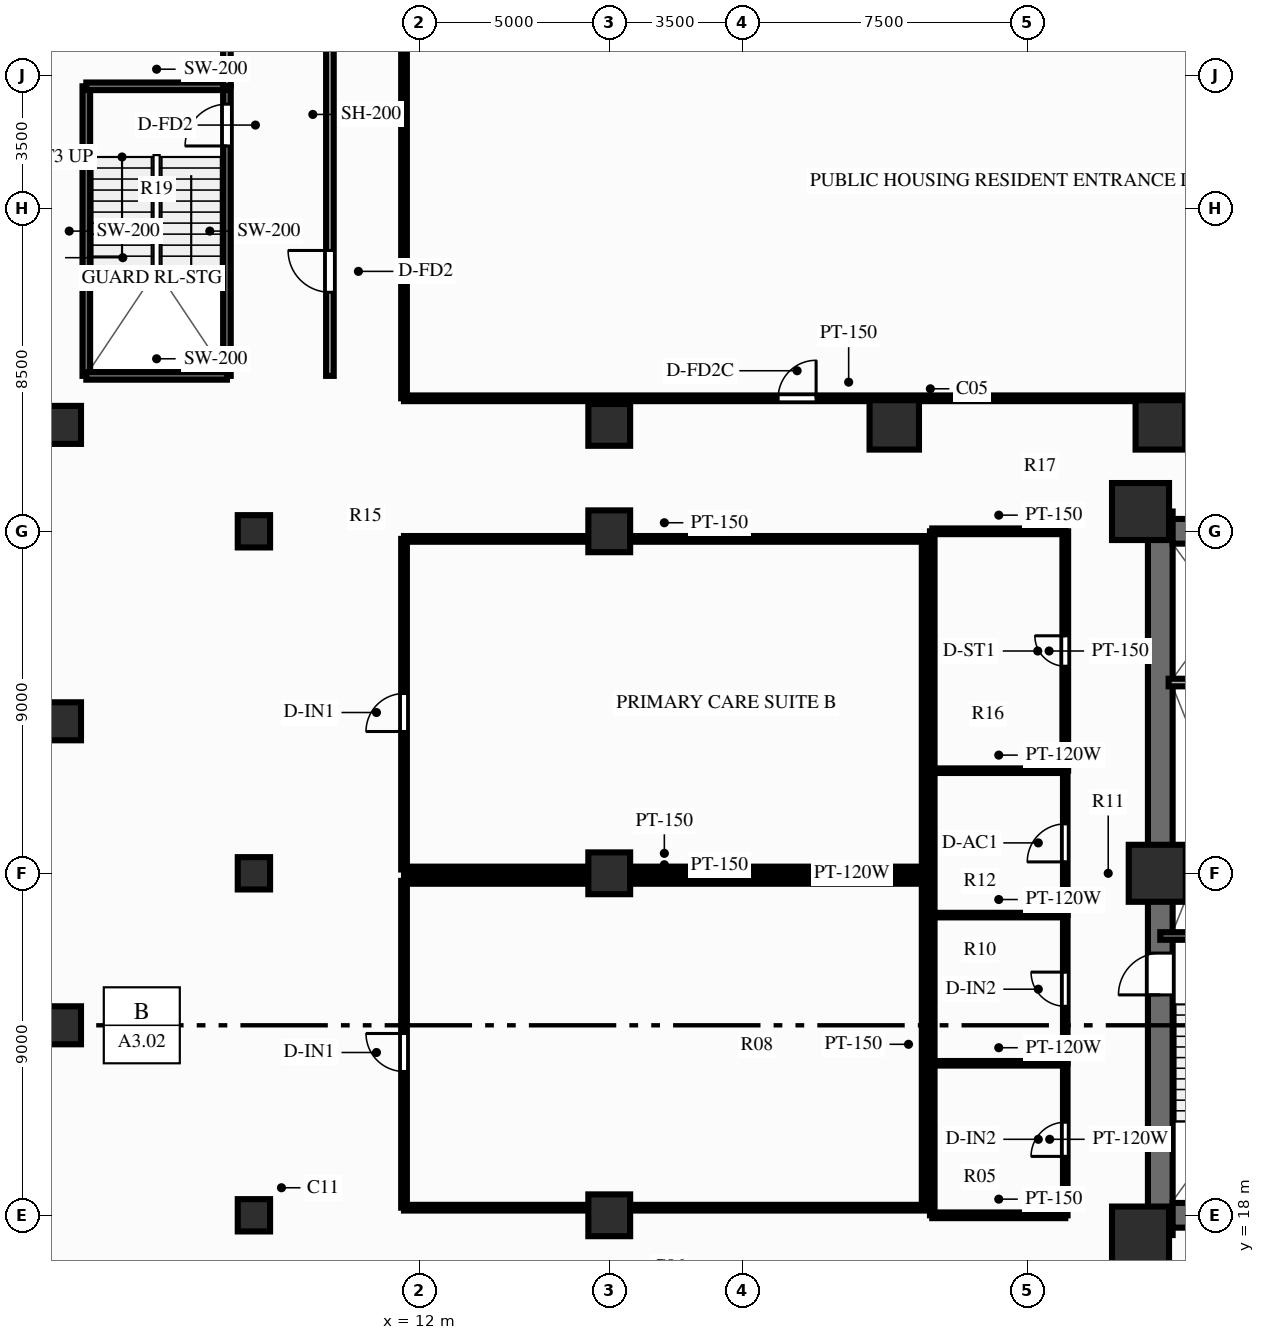
"""IFC4 building model, lengths in metres.
Left out: names, types, materials, properties, quantities, classifications, styles, units other than length and angle.
Written with IfcOpenShell. Run it as: python <this file> out.ifc"""

import sys

from ifc_helpers import new_model, si_unit, direction, frame, frame_2d, origin, origin_2d, place, context, subcontext, project, spatial, rectangle, circle, extrude, source, transform, mapped, element, fill, save


model = new_model("IFC4")
c1 = context("Model", 3, precision=1e-05, world=origin(), true_north=direction((0.0, 1.0)))
c2 = subcontext(c1, "Body", "Model", "MODEL_VIEW")
j1 = project(units=[si_unit("LENGTHUNIT", "METRE"), si_unit("PLANEANGLEUNIT", "RADIAN")], contexts=[c1])
p1 = place(None, origin())
s1 = spatial("IfcSite", under=j1, at=p1, CompositionType="ELEMENT")
p2 = place(p1, origin())
s2 = spatial("IfcBuilding", under=s1, at=p2, CompositionType="ELEMENT")
p3 = place(p2, origin())
s3 = spatial("IfcBuildingStorey", under=s2, at=p3, CompositionType="ELEMENT", Elevation=0.0)
p4 = place(p3, frame((31.5, 17.48, 0.0), z_axis=(0.0, 0.0, 1.0), x_axis=(0.0, 1.0, 0.0)))
e1 = element("IfcWall", 1, at=p4, inside=s3, PredefinedType="SHEAR", context=c2, shape_type="SweptSolid", body=[
    extrude(rectangle(XDim=19.04, YDim=0.65, at=frame_2d((9.52, 0.0))), origin(), (0.0, 0.0, 1.0), 4.2),
])
p5 = place(p4, frame((6.32, 0.0, 0.0)))
e2 = element("IfcOpeningElement", 2, at=p5, cuts=e1, PredefinedType="OPENING", context=c2, shape_type="SweptSolid", body=[
    extrude(rectangle(XDim=1.1, YDim=2.15, at=frame_2d((0.55, 1.075))), frame((0.0, 0.337, 0.0), z_axis=(0.0, -1.0, 0.0), x_axis=(1.0, 0.0, 0.0)), (0.0, 0.0, 1.0), 0.674),
])
p6 = place(p3, frame((31.825, 18.0, 0.0), z_axis=(0.0, 0.0, 1.0), x_axis=(1.0, 0.0, 0.0)))
e3 = element("IfcWall", 3, at=p6, inside=s3, PredefinedType="SHEAR", context=c2, shape_type="SweptSolid", body=[
    extrude(rectangle(XDim=12.35, YDim=0.65, at=frame_2d((6.175, 0.0))), origin(), (0.0, 0.0, 1.0), 4.2),
])
p7 = place(p3, frame((31.825, 36.0, 0.0), z_axis=(0.0, 0.0, 1.0), x_axis=(1.0, 0.0, 0.0)))
e4 = element("IfcWall", 4, at=p7, inside=s3, PredefinedType="SHEAR", context=c2, shape_type="SweptSolid", body=[
    extrude(rectangle(XDim=12.35, YDim=0.65, at=frame_2d((6.175, 0.0))), origin(), (0.0, 0.0, 1.0), 4.2),
])
p8 = place(p7, frame((5.125, 0.0, 0.0), z_axis=(0.0, 0.0, 1.0), x_axis=(-1.0, 0.0, 0.0)))
e5 = element("IfcOpeningElement", 5, at=p8, cuts=e4, PredefinedType="OPENING", context=c2, shape_type="SweptSolid", body=[
    extrude(rectangle(XDim=1.4, YDim=2.15, at=frame_2d((0.7, 1.075))), frame((0.0, 0.337, 0.0), z_axis=(0.0, -1.0, 0.0), x_axis=(1.0, 0.0, 0.0)), (0.0, 0.0, 1.0), 0.674),
])
m1 = source(origin(), c2, "Body", "SweptSolid", [
    extrude(rectangle(XDim=1.5, YDim=1.5, at=origin_2d()), origin(), (0.0, 0.0, 1.0), 4.2),
])
for number, where, z_axis, x_axis in (
    (6, (30.98, 17.48, 0.0), (0.0, 0.0, 1.0), (1.0, 0.0, 0.0)),
    (7, (30.98, 36.52, 0.0), (0.0, 0.0, 1.0), (1.0, 0.0, 0.0)),
    (8, (31.42, 27.0, 0.0), (0.0, 0.0, 1.0), (1.0, 0.0, 0.0)),
):
    element("IfcColumn", number, at=place(p3, frame(where, z_axis=z_axis, x_axis=x_axis)), inside=s3, PredefinedType="COLUMN", context=c2, shape_type="MappedRepresentation", body=[
        mapped(m1, transform((0.0, 0.0, 0.0), scale=1.0)),
    ])
m2 = source(origin(), c2, "Body", "SweptSolid", [
    extrude(circle(Radius=0.5, at=origin_2d()), origin(), (0.0, 0.0, 1.0), 4.2),
])
for number, where, z_axis, x_axis in (
    (9, (2.6, 23.0, 0.0), (0.0, 0.0, 1.0), (1.0, 0.0, 0.0)),
    (10, (2.6, 31.0, 0.0), (0.0, 0.0, 1.0), (1.0, 0.0, 0.0)),
    (11, (2.6, 38.8, 0.0), (0.0, 0.0, 1.0), (1.0, 0.0, 0.0)),
):
    element("IfcColumn", number, at=place(p3, frame(where, z_axis=z_axis, x_axis=x_axis)), inside=s3, PredefinedType="COLUMN", context=c2, shape_type="MappedRepresentation", body=[
        mapped(m2, transform((0.0, 0.0, 0.0), scale=1.0)),
    ])
m3 = source(origin(), c2, "Body", "SweptSolid", [
    extrude(circle(Radius=0.425, at=origin_2d()), origin(), (0.0, 0.0, 1.0), 4.2),
])
for number, where, z_axis, x_axis in (
    (12, (7.65, 18.0, 0.0), (0.0, 0.0, 1.0), (1.0, 0.0, 0.0)),
    (13, (7.65, 27.0, 0.0), (0.0, 0.0, 1.0), (1.0, 0.0, 0.0)),
    (14, (7.65, 36.0, 0.0), (0.0, 0.0, 1.0), (1.0, 0.0, 0.0)),
):
    element("IfcColumn", number, at=place(p3, frame(where, z_axis=z_axis, x_axis=x_axis)), inside=s3, PredefinedType="COLUMN", context=c2, shape_type="MappedRepresentation", body=[
        mapped(m3, transform((0.0, 0.0, 0.0), scale=1.0)),
    ])
m4 = source(origin(), c2, "Body", "SweptSolid", [
    extrude(rectangle(XDim=1.1, YDim=1.1, at=origin_2d()), origin(), (0.0, 0.0, 1.0), 4.2),
])
for number, where, z_axis, x_axis in (
    (15, (17.0, 18.0, 0.0), (0.0, 0.0, 1.0), (1.0, 0.0, 0.0)),
    (16, (17.0, 27.0, 0.0), (0.0, 0.0, 1.0), (1.0, 0.0, 0.0)),
    (17, (17.0, 36.0, 0.0), (0.0, 0.0, 1.0), (1.0, 0.0, 0.0)),
    (18, (17.0, 38.8, 0.0), (0.0, 0.0, 1.0), (1.0, 0.0, 0.0)),
):
    element("IfcColumn", number, at=place(p3, frame(where, z_axis=z_axis, x_axis=x_axis)), inside=s3, PredefinedType="COLUMN", context=c2, shape_type="MappedRepresentation", body=[
        mapped(m4, transform((0.0, 0.0, 0.0), scale=1.0)),
    ])
m5 = source(origin(), c2, "Body", "SweptSolid", [
    extrude(rectangle(XDim=1.3, YDim=1.3, at=origin_2d()), origin(), (0.0, 0.0, 1.0), 4.2),
])
for number, where, z_axis, x_axis in (
    (19, (24.5, 38.8, 0.0), (0.0, 0.0, 1.0), (1.0, 0.0, 0.0)),
    (20, (31.5, 38.8, 0.0), (0.0, 0.0, 1.0), (1.0, 0.0, 0.0)),
):
    element("IfcColumn", number, at=place(p3, frame(where, z_axis=z_axis, x_axis=x_axis)), inside=s3, PredefinedType="COLUMN", context=c2, shape_type="MappedRepresentation", body=[
        mapped(m5, transform((0.0, 0.0, 0.0), scale=1.0)),
    ])
p9 = place(p3, frame((31.5, 25.35, 0.0), z_axis=(0.0, 0.0, 1.0), x_axis=(1.0, 0.0, 0.0)))
e21 = element("IfcWall", 21, at=p9, inside=s3, PredefinedType="SOLIDWALL", context=c2, shape_type="SweptSolid", body=[
    extrude(rectangle(XDim=3.93, YDim=0.2, at=frame_2d((1.965, 0.0))), origin(), (0.0, 0.0, 1.0), 3.92),
])
p10 = place(p3, frame((31.72, 32.02, 0.0), z_axis=(0.0, 0.0, 1.0), x_axis=(1.0, 0.0, 0.0)))
e22 = element("IfcWall", 22, at=p10, inside=s3, PredefinedType="PARTITIONING", context=c2, shape_type="SweptSolid", body=[
    extrude(rectangle(XDim=2.8, YDim=0.2, at=frame_2d((1.4, 0.0))), origin(), (0.0, 0.0, 1.0), 3.92),
])
p11 = place(p3, frame((3.24, 40.09, 0.0), z_axis=(0.0, 0.0, 1.0), x_axis=(0.0, 1.0, 0.0)))
e23 = element("IfcWall", 23, at=p11, inside=s3, PredefinedType="SOLIDWALL", context=c2, shape_type="SweptSolid", body=[
    extrude(rectangle(XDim=7.62, YDim=0.2, at=frame_2d((3.81, 0.0))), origin(), (0.0, 0.0, 1.0), 3.92),
])
p12 = place(p3, frame((6.94, 40.09, 0.0), z_axis=(0.0, 0.0, 1.0), x_axis=(0.0, 1.0, 0.0)))
e24 = element("IfcWall", 24, at=p12, inside=s3, PredefinedType="SOLIDWALL", context=c2, shape_type="SweptSolid", body=[
    extrude(rectangle(XDim=7.62, YDim=0.2, at=frame_2d((3.81, 0.0))), origin(), (0.0, 0.0, 1.0), 3.92),
])
p13 = place(p12, frame((7.15, 0.0, 0.0), z_axis=(0.0, 0.0, 1.0), x_axis=(-1.0, 0.0, 0.0)))
e25 = element("IfcOpeningElement", 25, at=p13, cuts=e24, PredefinedType="OPENING", context=c2, shape_type="SweptSolid", body=[
    extrude(rectangle(XDim=1.1, YDim=2.15, at=frame_2d((0.55, 1.075))), frame((0.0, 0.112, 0.0), z_axis=(0.0, -1.0, 0.0), x_axis=(1.0, 0.0, 0.0)), (0.0, 0.0, 1.0), 0.224),
])
for number, where, z_axis, x_axis in (
    (26, (3.24, 40.09, 0.0), (0.0, 0.0, 1.0), (1.0, 0.0, 0.0)),
    (27, (3.24, 47.71, 0.0), (0.0, 0.0, 1.0), (1.0, 0.0, 0.0)),
):
    element("IfcWall", number, at=place(p3, frame(where, z_axis=z_axis, x_axis=x_axis)), inside=s3, PredefinedType="SOLIDWALL", context=c2, shape_type="SweptSolid", body=[
        extrude(rectangle(XDim=3.7, YDim=0.2, at=frame_2d((1.85, 0.0))), origin(), (0.0, 0.0, 1.0), 3.92),
    ])
p14 = place(p3, frame((6.94, 47.71, 0.0), z_axis=(0.0, 0.0, 1.0), x_axis=(0.0, 1.0, 0.0)))
e28 = element("IfcWall", 28, at=p14, inside=s3, PredefinedType="PARTITIONING", context=c2, shape_type="SweptSolid", body=[
    extrude(rectangle(XDim=6.14, YDim=0.2, at=frame_2d((3.07, 0.0))), origin(), (0.0, 0.0, 1.0), 3.92),
])
p15 = place(p3, frame((9.65, 40.09, 0.0), z_axis=(0.0, 0.0, 1.0), x_axis=(0.0, 1.0, 0.0)))
e29 = element("IfcWall", 29, at=p15, inside=s3, PredefinedType="PARTITIONING", context=c2, shape_type="SweptSolid", body=[
    extrude(rectangle(XDim=13.76, YDim=0.2, at=frame_2d((6.88, 0.0))), origin(), (0.0, 0.0, 1.0), 3.92),
])
p16 = place(p15, frame((3.3, 0.0, 0.0), z_axis=(0.0, 0.0, 1.0), x_axis=(-1.0, 0.0, 0.0)))
e30 = element("IfcOpeningElement", 30, at=p16, cuts=e29, PredefinedType="OPENING", context=c2, shape_type="SweptSolid", body=[
    extrude(rectangle(XDim=1.1, YDim=2.15, at=frame_2d((0.55, 1.075))), frame((0.0, 0.112, 0.0), z_axis=(0.0, -1.0, 0.0), x_axis=(1.0, 0.0, 0.0)), (0.0, 0.0, 1.0), 0.224),
])
p17 = place(p3, frame((25.5, 18.0, 0.0), z_axis=(0.0, 0.0, 1.0), x_axis=(0.0, 1.0, 0.0)))
e31 = element("IfcWall", 31, at=p17, inside=s3, PredefinedType="PARTITIONING", context=c2, shape_type="SweptSolid", body=[
    extrude(rectangle(XDim=18.0, YDim=0.12, at=frame_2d((9.0, 0.0))), origin(), (0.0, 0.0, 1.0), 3.92),
])
p18 = place(p3, frame((29.0, 18.0, 0.0), z_axis=(0.0, 0.0, 1.0), x_axis=(0.0, 1.0, 0.0)))
e32 = element("IfcWall", 32, at=p18, inside=s3, PredefinedType="PARTITIONING", context=c2, shape_type="SweptSolid", body=[
    extrude(rectangle(XDim=4.0, YDim=0.12, at=frame_2d((2.0, 0.0))), origin(), (0.0, 0.0, 1.0), 3.92),
])
p19 = place(p18, frame((1.55, 0.0, 0.0)))
e33 = element("IfcOpeningElement", 33, at=p19, cuts=e32, PredefinedType="OPENING", context=c2, shape_type="SweptSolid", body=[
    extrude(rectangle(XDim=0.9, YDim=2.1, at=frame_2d((0.45, 1.05))), frame((0.0, 0.072, 0.0), z_axis=(0.0, -1.0, 0.0), x_axis=(1.0, 0.0, 0.0)), (0.0, 0.0, 1.0), 0.144),
])
p20 = place(p3, frame((29.0, 22.0, 0.0), z_axis=(0.0, 0.0, 1.0), x_axis=(0.0, 1.0, 0.0)))
e34 = element("IfcWall", 34, at=p20, inside=s3, PredefinedType="PARTITIONING", context=c2, shape_type="SweptSolid", body=[
    extrude(rectangle(XDim=3.9, YDim=0.12, at=frame_2d((1.95, 0.0))), origin(), (0.0, 0.0, 1.0), 3.92),
])
p21 = place(p20, frame((1.5, 0.0, 0.0)))
e35 = element("IfcOpeningElement", 35, at=p21, cuts=e34, PredefinedType="OPENING", context=c2, shape_type="SweptSolid", body=[
    extrude(rectangle(XDim=0.9, YDim=2.1, at=frame_2d((0.45, 1.05))), frame((0.0, 0.072, 0.0), z_axis=(0.0, -1.0, 0.0), x_axis=(1.0, 0.0, 0.0)), (0.0, 0.0, 1.0), 0.144),
])
p22 = place(p3, frame((29.0, 25.9, 0.0), z_axis=(0.0, 0.0, 1.0), x_axis=(0.0, 1.0, 0.0)))
e36 = element("IfcWall", 36, at=p22, inside=s3, PredefinedType="PARTITIONING", context=c2, shape_type="SweptSolid", body=[
    extrude(rectangle(XDim=3.8, YDim=0.12, at=frame_2d((1.9, 0.0))), origin(), (0.0, 0.0, 1.0), 3.92),
])
p23 = place(p22, frame((1.4, 0.0, 0.0)))
e37 = element("IfcOpeningElement", 37, at=p23, cuts=e36, PredefinedType="OPENING", context=c2, shape_type="SweptSolid", body=[
    extrude(rectangle(XDim=1.0, YDim=2.1, at=frame_2d((0.5, 1.05))), frame((0.0, 0.072, 0.0), z_axis=(0.0, -1.0, 0.0), x_axis=(1.0, 0.0, 0.0)), (0.0, 0.0, 1.0), 0.144),
])
p24 = place(p3, frame((29.0, 29.7, 0.0), z_axis=(0.0, 0.0, 1.0), x_axis=(0.0, 1.0, 0.0)))
e38 = element("IfcWall", 38, at=p24, inside=s3, PredefinedType="PARTITIONING", context=c2, shape_type="SweptSolid", body=[
    extrude(rectangle(XDim=6.3, YDim=0.15, at=frame_2d((3.15, 0.0))), origin(), (0.0, 0.0, 1.0), 3.92),
])
p25 = place(p24, frame((2.75, 0.0, 0.0)))
e39 = element("IfcOpeningElement", 39, at=p25, cuts=e38, PredefinedType="OPENING", context=c2, shape_type="SweptSolid", body=[
    extrude(rectangle(XDim=0.8, YDim=2.05, at=frame_2d((0.4, 1.025))), frame((0.0, 0.087, 0.0), z_axis=(0.0, -1.0, 0.0), x_axis=(1.0, 0.0, 0.0)), (0.0, 0.0, 1.0), 0.174),
])
for number, where, z_axis, x_axis in (
    (40, (25.5, 22.0, 0.0), (0.0, 0.0, 1.0), (1.0, 0.0, 0.0)),
    (41, (25.5, 25.9, 0.0), (0.0, 0.0, 1.0), (1.0, 0.0, 0.0)),
    (42, (25.5, 29.7, 0.0), (0.0, 0.0, 1.0), (1.0, 0.0, 0.0)),
):
    element("IfcWall", number, at=place(p3, frame(where, z_axis=z_axis, x_axis=x_axis)), inside=s3, PredefinedType="PARTITIONING", context=c2, shape_type="SweptSolid", body=[
        extrude(rectangle(XDim=3.5, YDim=0.12, at=frame_2d((1.75, 0.0))), origin(), (0.0, 0.0, 1.0), 3.92),
    ])
for number, where, z_axis, x_axis in (
    (43, (25.5, 36.0, 0.0), (0.0, 0.0, 1.0), (1.0, 0.0, 0.0)),
    (44, (25.5, 18.0, 0.0), (0.0, 0.0, 1.0), (1.0, 0.0, 0.0)),
):
    element("IfcWall", number, at=place(p3, frame(where, z_axis=z_axis, x_axis=x_axis)), inside=s3, PredefinedType="PARTITIONING", context=c2, shape_type="SweptSolid", body=[
        extrude(rectangle(XDim=3.5, YDim=0.15, at=frame_2d((1.75, 0.0))), origin(), (0.0, 0.0, 1.0), 3.29),
    ])
p26 = place(p3, frame((11.6, 39.5, 0.0), z_axis=(0.0, 0.0, 1.0), x_axis=(1.0, 0.0, 0.0)))
e45 = element("IfcWall", 45, at=p26, inside=s3, PredefinedType="PARTITIONING", context=c2, shape_type="SweptSolid", body=[
    extrude(rectangle(XDim=23.4, YDim=0.15, at=frame_2d((11.7, 0.0))), origin(), (0.0, 0.0, 1.0), 3.92),
])
p27 = place(p26, frame((9.844, 0.0, 0.0)))
e46 = element("IfcOpeningElement", 46, at=p27, cuts=e45, PredefinedType="OPENING", context=c2, shape_type="SweptSolid", body=[
    extrude(rectangle(XDim=1.0, YDim=2.15, at=frame_2d((0.5, 1.075))), frame((0.0, 0.087, 0.0), z_axis=(0.0, -1.0, 0.0), x_axis=(1.0, 0.0, 0.0)), (0.0, 0.0, 1.0), 0.174),
])
p28 = place(p3, frame((11.6, 39.5, 0.0), z_axis=(0.0, 0.0, 1.0), x_axis=(0.0, 1.0, 0.0)))
e47 = element("IfcWall", 47, at=p28, inside=s3, PredefinedType="PARTITIONING", context=c2, shape_type="SweptSolid", body=[
    extrude(rectangle(XDim=14.4, YDim=0.15, at=frame_2d((7.2, 0.0))), origin(), (0.0, 0.0, 1.0), 3.92),
])
for number, where, z_axis, x_axis in (
    (48, (11.6, 18.2, 0.0), (0.0, 0.0, 1.0), (1.0, 0.0, 0.0)),
    (49, (11.6, 26.8, 0.0), (0.0, 0.0, 1.0), (1.0, 0.0, 0.0)),
):
    element("IfcWall", number, at=place(p3, frame(where, z_axis=z_axis, x_axis=x_axis)), inside=s3, PredefinedType="PARTITIONING", context=c2, shape_type="SweptSolid", body=[
        extrude(rectangle(XDim=13.7, YDim=0.15, at=frame_2d((6.85, 0.0))), origin(), (0.0, 0.0, 1.0), 3.92),
    ])
p29 = place(p3, frame((11.6, 18.2, 0.0), z_axis=(0.0, 0.0, 1.0), x_axis=(0.0, 1.0, 0.0)))
e50 = element("IfcWall", 50, at=p29, inside=s3, PredefinedType="PARTITIONING", context=c2, shape_type="SweptSolid", body=[
    extrude(rectangle(XDim=8.6, YDim=0.15, at=frame_2d((4.3, 0.0))), origin(), (0.0, 0.0, 1.0), 3.92),
])
p30 = place(p29, frame((3.584, 0.0, 0.0)))
e51 = element("IfcOpeningElement", 51, at=p30, cuts=e50, PredefinedType="OPENING", context=c2, shape_type="SweptSolid", body=[
    extrude(rectangle(XDim=1.0, YDim=2.1, at=frame_2d((0.5, 1.05))), frame((0.0, 0.087, 0.0), z_axis=(0.0, -1.0, 0.0), x_axis=(1.0, 0.0, 0.0)), (0.0, 0.0, 1.0), 0.174),
])
p31 = place(p3, frame((25.3, 18.2, 0.0), z_axis=(0.0, 0.0, 1.0), x_axis=(0.0, 1.0, 0.0)))
e52 = element("IfcWall", 52, at=p31, inside=s3, PredefinedType="PARTITIONING", context=c2, shape_type="SweptSolid", body=[
    extrude(rectangle(XDim=8.6, YDim=0.15, at=frame_2d((4.3, 0.0))), origin(), (0.0, 0.0, 1.0), 3.92),
])
for number, where, z_axis, x_axis in (
    (53, (11.6, 27.1, 0.0), (0.0, 0.0, 1.0), (1.0, 0.0, 0.0)),
    (54, (11.6, 35.8, 0.0), (0.0, 0.0, 1.0), (1.0, 0.0, 0.0)),
):
    element("IfcWall", number, at=place(p3, frame(where, z_axis=z_axis, x_axis=x_axis)), inside=s3, PredefinedType="PARTITIONING", context=c2, shape_type="SweptSolid", body=[
        extrude(rectangle(XDim=13.7, YDim=0.15, at=frame_2d((6.85, 0.0))), origin(), (0.0, 0.0, 1.0), 3.92),
    ])
p32 = place(p3, frame((11.6, 27.1, 0.0), z_axis=(0.0, 0.0, 1.0), x_axis=(0.0, 1.0, 0.0)))
e55 = element("IfcWall", 55, at=p32, inside=s3, PredefinedType="PARTITIONING", context=c2, shape_type="SweptSolid", body=[
    extrude(rectangle(XDim=8.7, YDim=0.15, at=frame_2d((4.35, 0.0))), origin(), (0.0, 0.0, 1.0), 3.92),
])
p33 = place(p32, frame((3.631, 0.0, 0.0)))
e56 = element("IfcOpeningElement", 56, at=p33, cuts=e55, PredefinedType="OPENING", context=c2, shape_type="SweptSolid", body=[
    extrude(rectangle(XDim=1.0, YDim=2.1, at=frame_2d((0.5, 1.05))), frame((0.0, 0.087, 0.0), z_axis=(0.0, -1.0, 0.0), x_axis=(1.0, 0.0, 0.0)), (0.0, 0.0, 1.0), 0.174),
])
p34 = place(p3, frame((25.3, 27.1, 0.0), z_axis=(0.0, 0.0, 1.0), x_axis=(0.0, 1.0, 0.0)))
e57 = element("IfcWall", 57, at=p34, inside=s3, PredefinedType="PARTITIONING", context=c2, shape_type="SweptSolid", body=[
    extrude(rectangle(XDim=8.7, YDim=0.15, at=frame_2d((4.35, 0.0))), origin(), (0.0, 0.0, 1.0), 3.92),
])
m6 = source(origin(), c2, "Body", "SweptSolid", [
    extrude(rectangle(XDim=1.1, YDim=2.15, at=frame_2d((0.55, 1.075))), frame((0.0, 0.025, 0.0), z_axis=(0.0, -1.0, 0.0), x_axis=(1.0, 0.0, 0.0)), (0.0, 0.0, 1.0), 0.05),
])
p35 = place(p5, origin())
e58 = element("IfcDoor", 58, at=p35, inside=s3, OperationType="SINGLE_SWING_LEFT", PredefinedType="DOOR", context=c2, shape_type="MappedRepresentation", body=[
    mapped(m6, transform((0.0, 0.0, 0.0), scale=1.0)),
])
fill(e2, e58)
p36 = place(p13, origin())
e59 = element("IfcDoor", 59, at=p36, inside=s3, OperationType="SINGLE_SWING_RIGHT", PredefinedType="DOOR", context=c2, shape_type="MappedRepresentation", body=[
    mapped(m6, transform((0.0, 0.0, 0.0), scale=1.0)),
])
fill(e25, e59)
p37 = place(p16, origin())
e60 = element("IfcDoor", 60, at=p37, inside=s3, OperationType="SINGLE_SWING_LEFT", PredefinedType="DOOR", context=c2, shape_type="MappedRepresentation", body=[
    mapped(m6, transform((0.0, 0.0, 0.0), scale=1.0)),
])
fill(e30, e60)
m7 = source(origin(), c2, "Body", "SweptSolid", [
    extrude(rectangle(XDim=0.9, YDim=2.1, at=frame_2d((0.45, 1.05))), frame((0.0, 0.025, 0.0), z_axis=(0.0, -1.0, 0.0), x_axis=(1.0, 0.0, 0.0)), (0.0, 0.0, 1.0), 0.05),
])
p38 = place(p19, origin())
e61 = element("IfcDoor", 61, at=p38, inside=s3, OperationType="SINGLE_SWING_LEFT", PredefinedType="DOOR", context=c2, shape_type="MappedRepresentation", body=[
    mapped(m7, transform((0.0, 0.0, 0.0), scale=1.0)),
])
fill(e33, e61)
p39 = place(p21, origin())
e62 = element("IfcDoor", 62, at=p39, inside=s3, OperationType="SINGLE_SWING_RIGHT", PredefinedType="DOOR", context=c2, shape_type="MappedRepresentation", body=[
    mapped(m7, transform((0.0, 0.0, 0.0), scale=1.0)),
])
fill(e35, e62)
m8 = source(origin(), c2, "Body", "SweptSolid", [
    extrude(rectangle(XDim=1.0, YDim=2.1, at=frame_2d((0.5, 1.05))), frame((0.0, 0.025, 0.0), z_axis=(0.0, -1.0, 0.0), x_axis=(1.0, 0.0, 0.0)), (0.0, 0.0, 1.0), 0.05),
])
p40 = place(p23, origin())
e63 = element("IfcDoor", 63, at=p40, inside=s3, OperationType="SINGLE_SWING_LEFT", PredefinedType="DOOR", context=c2, shape_type="MappedRepresentation", body=[
    mapped(m8, transform((0.0, 0.0, 0.0), scale=1.0)),
])
fill(e37, e63)
m9 = source(origin(), c2, "Body", "SweptSolid", [
    extrude(rectangle(XDim=0.8, YDim=2.05, at=frame_2d((0.4, 1.025))), frame((0.0, 0.025, 0.0), z_axis=(0.0, -1.0, 0.0), x_axis=(1.0, 0.0, 0.0)), (0.0, 0.0, 1.0), 0.05),
])
p41 = place(p25, origin())
e64 = element("IfcDoor", 64, at=p41, inside=s3, OperationType="SINGLE_SWING_RIGHT", PredefinedType="DOOR", context=c2, shape_type="MappedRepresentation", body=[
    mapped(m9, transform((0.0, 0.0, 0.0), scale=1.0)),
])
fill(e39, e64)
m10 = source(origin(), c2, "Body", "SweptSolid", [
    extrude(rectangle(XDim=1.0, YDim=2.15, at=frame_2d((0.5, 1.075))), frame((0.0, 0.025, 0.0), z_axis=(0.0, -1.0, 0.0), x_axis=(1.0, 0.0, 0.0)), (0.0, 0.0, 1.0), 0.05),
])
p42 = place(p27, origin())
e65 = element("IfcDoor", 65, at=p42, inside=s3, OperationType="SINGLE_SWING_RIGHT", PredefinedType="DOOR", context=c2, shape_type="MappedRepresentation", body=[
    mapped(m10, transform((0.0, 0.0, 0.0), scale=1.0)),
])
fill(e46, e65)
p43 = place(p30, origin())
e66 = element("IfcDoor", 66, at=p43, inside=s3, OperationType="SINGLE_SWING_RIGHT", PredefinedType="DOOR", context=c2, shape_type="MappedRepresentation", body=[
    mapped(m8, transform((0.0, 0.0, 0.0), scale=1.0)),
])
fill(e51, e66)
p44 = place(p33, origin())
e67 = element("IfcDoor", 67, at=p44, inside=s3, OperationType="SINGLE_SWING_LEFT", PredefinedType="DOOR", context=c2, shape_type="MappedRepresentation", body=[
    mapped(m8, transform((0.0, 0.0, 0.0), scale=1.0)),
])
fill(e56, e67)
save(model, sys.argv[1])
